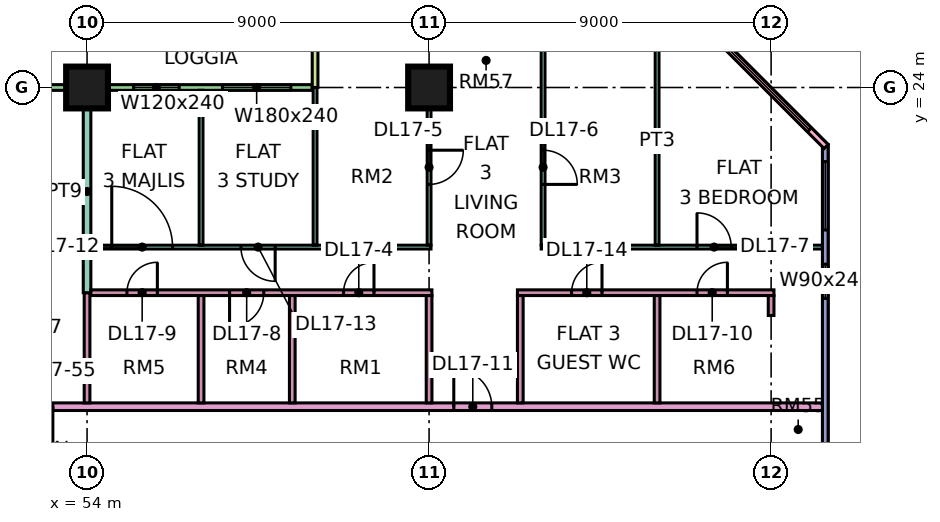
"""IFC4 building model, lengths in metres.
Left out: names, types, materials, properties, quantities, classifications, styles, units other than length and angle.
Written with IfcOpenShell. Run it as: python <this file> out.ifc"""

import sys

from ifc_helpers import new_model, si_unit, direction, frame, frame_2d, origin, origin_2d, place, context, subcontext, project, spatial, rectangle, extrude, element, fill, save


model = new_model("IFC4")
c1 = context("Model", 3, precision=1e-05, world=origin(), true_north=direction((0.0, 1.0)))
c2 = subcontext(c1, "Body", "Model", "MODEL_VIEW")
j1 = project(units=[si_unit("LENGTHUNIT", "METRE"), si_unit("PLANEANGLEUNIT", "RADIAN")], contexts=[c1])
p1 = place(None, origin())
s1 = spatial("IfcSite", under=j1, at=p1, CompositionType="ELEMENT")
p2 = place(p1, origin())
s2 = spatial("IfcBuilding", under=s1, at=p2, CompositionType="ELEMENT")
p3 = place(p2, frame((0.0, 0.0, 78.9)))
s3 = spatial("IfcBuildingStorey", under=s2, at=p3, CompositionType="ELEMENT", Elevation=78.9)
for number, where, z_axis, x_axis in (
    (1, (54.0, 24.0, 0.0), (0.0, 0.0, 1.0), (1.0, 0.0, 0.0)),
    (2, (63.0, 24.0, 0.0), (0.0, 0.0, 1.0), (1.0, 0.0, 0.0)),
):
    element("IfcColumn", number, at=place(p3, frame(where, z_axis=z_axis, x_axis=x_axis)), inside=s3, PredefinedType="COLUMN", context=c2, shape_type="SweptSolid", body=[
        extrude(rectangle(XDim=1.1, YDim=1.1, at=origin_2d()), origin(), (0.0, 0.0, 1.0), 3.75),
    ])
p4 = place(p3, frame((59.925, 24.0, 0.0), z_axis=(0.0, 0.0, 1.0), x_axis=(-1.0, 0.0, 0.0)))
e3 = element("IfcWall", 3, at=p4, inside=s3, PredefinedType="SOLIDWALL", context=c2, shape_type="SweptSolid", body=[
    extrude(rectangle(XDim=11.85, YDim=0.15, at=frame_2d((5.925, 0.0))), origin(), (0.0, 0.0, 1.0), 3.35),
])
p5 = place(p4, frame((0.562, 0.0, 0.45)))
e4 = element("IfcOpeningElement", 4, at=p5, cuts=e3, PredefinedType="OPENING", context=c2, shape_type="SweptSolid", body=[
    extrude(rectangle(XDim=1.8, YDim=2.4, at=frame_2d((0.9, 1.2))), frame((0.0, 0.085, 0.0), z_axis=(0.0, -1.0, 0.0), x_axis=(1.0, 0.0, 0.0)), (0.0, 0.0, 1.0), 0.17),
])
p6 = place(p4, frame((3.5, 0.0, 0.45)))
e5 = element("IfcOpeningElement", 5, at=p6, cuts=e3, PredefinedType="OPENING", context=c2, shape_type="SweptSolid", body=[
    extrude(rectangle(XDim=1.2, YDim=2.4, at=frame_2d((0.6, 1.2))), frame((0.0, 0.085, 0.0), z_axis=(0.0, -1.0, 0.0), x_axis=(1.0, 0.0, 0.0)), (0.0, 0.0, 1.0), 0.17),
])
p7 = place(p4, frame((7.113, 0.0, 0.45)))
e6 = element("IfcOpeningElement", 6, at=p7, cuts=e3, PredefinedType="OPENING", context=c2, shape_type="SweptSolid", body=[
    extrude(rectangle(XDim=4.2, YDim=2.4, at=frame_2d((2.1, 1.2))), frame((0.0, 0.085, 0.0), z_axis=(0.0, -1.0, 0.0), x_axis=(1.0, 0.0, 0.0)), (0.0, 0.0, 1.0), 0.17),
])
p8 = place(p3, frame((60.0, 25.5, 0.0), z_axis=(0.0, 0.0, 1.0), x_axis=(0.0, -1.0, 0.0)))
e7 = element("IfcWall", 7, at=p8, inside=s3, PredefinedType="SOLIDWALL", context=c2, shape_type="SweptSolid", body=[
    extrude(rectangle(XDim=1.5, YDim=0.15, at=frame_2d((0.75, 0.0))), origin(), (0.0, 0.0, 1.0), 3.35),
])
p9 = place(p3, frame((73.425, 12.075, 0.0), z_axis=(0.0, 0.0, 1.0), x_axis=(0.0, 1.0, 0.0)))
e8 = element("IfcWall", 8, at=p9, inside=s3, PredefinedType="SOLIDWALL", context=c2, shape_type="SweptSolid", body=[
    extrude(rectangle(XDim=10.425, YDim=0.15, at=frame_2d((5.212, 0.0))), origin(), (0.0, 0.0, 1.0), 3.35),
])
p10 = place(p9, frame((6.375, 0.0, 0.45)))
e9 = element("IfcOpeningElement", 9, at=p10, cuts=e8, PredefinedType="OPENING", context=c2, shape_type="SweptSolid", body=[
    extrude(rectangle(XDim=0.9, YDim=2.4, at=frame_2d((0.45, 1.2))), frame((0.0, 0.085, 0.0), z_axis=(0.0, -1.0, 0.0), x_axis=(1.0, 0.0, 0.0)), (0.0, 0.0, 1.0), 0.17),
])
p11 = place(p9, frame((8.175, 0.0, 0.45)))
e10 = element("IfcOpeningElement", 10, at=p11, cuts=e8, PredefinedType="OPENING", context=c2, shape_type="SweptSolid", body=[
    extrude(rectangle(XDim=1.8, YDim=2.4, at=frame_2d((0.9, 1.2))), frame((0.0, 0.085, 0.0), z_axis=(0.0, -1.0, 0.0), x_axis=(1.0, 0.0, 0.0)), (0.0, 0.0, 1.0), 0.17),
])
p12 = place(p3, frame((73.447, 22.447, 0.0), z_axis=(0.0, 0.0, 1.0), x_axis=(-0.707106781187, 0.707106781187, 0.0)))
e11 = element("IfcWall", 11, at=p12, inside=s3, PredefinedType="SOLIDWALL", context=c2, shape_type="SweptSolid", body=[
    extrude(rectangle(XDim=4.243, YDim=0.15, at=frame_2d((2.121, 0.0))), origin(), (0.0, 0.0, 1.0), 3.35),
])
p13 = place(p12, frame((0.621, 0.0, 0.45)))
e12 = element("IfcOpeningElement", 12, at=p13, cuts=e11, PredefinedType="OPENING", context=c2, shape_type="SweptSolid", body=[
    extrude(rectangle(XDim=3.0, YDim=2.4, at=frame_2d((1.5, 1.2))), frame((0.0, 0.085, 0.0), z_axis=(0.0, -1.0, 0.0), x_axis=(1.0, 0.0, 0.0)), (0.0, 0.0, 1.0), 0.17),
])
p14 = place(p3, frame((51.225, 15.6, 0.0), z_axis=(0.0, 0.0, 1.0), x_axis=(1.0, 0.0, 0.0)))
e13 = element("IfcWall", 13, at=p14, inside=s3, PredefinedType="PARTITIONING", context=c2, shape_type="SweptSolid", body=[
    extrude(rectangle(XDim=22.125, YDim=0.2, at=frame_2d((11.062, 0.0))), origin(), (0.0, 0.0, 1.0), 3.35),
])
p15 = place(p14, frame((12.425, 0.0, 0.0)))
e14 = element("IfcOpeningElement", 14, at=p15, cuts=e13, PredefinedType="OPENING", context=c2, shape_type="SweptSolid", body=[
    extrude(rectangle(XDim=1.0, YDim=2.1, at=frame_2d((0.5, 1.05))), frame((0.0, 0.11, 0.0), z_axis=(0.0, -1.0, 0.0), x_axis=(1.0, 0.0, 0.0)), (0.0, 0.0, 1.0), 0.22),
])
p16 = place(p14, frame((0.875, 0.0, 0.0)))
e15 = element("IfcOpeningElement", 15, at=p16, cuts=e13, PredefinedType="OPENING", context=c2, shape_type="SweptSolid", body=[
    extrude(rectangle(XDim=1.0, YDim=2.1, at=frame_2d((0.5, 1.05))), frame((0.0, 0.11, 0.0), z_axis=(0.0, -1.0, 0.0), x_axis=(1.0, 0.0, 0.0)), (0.0, 0.0, 1.0), 0.22),
])
p17 = place(p3, frame((54.0, 15.7, 0.0), z_axis=(0.0, 0.0, 1.0), x_axis=(0.0, 1.0, 0.0)))
e16 = element("IfcWall", 16, at=p17, inside=s3, PredefinedType="PARTITIONING", context=c2, shape_type="SweptSolid", body=[
    extrude(rectangle(XDim=2.9, YDim=0.15, at=frame_2d((1.45, 0.0))), origin(), (0.0, 0.0, 1.0), 3.35),
])
p18 = place(p3, frame((54.0, 18.6, 0.0), z_axis=(0.0, 0.0, 1.0), x_axis=(0.0, 1.0, 0.0)))
e17 = element("IfcWall", 17, at=p18, inside=s3, PredefinedType="PARTITIONING", context=c2, shape_type="SweptSolid", body=[
    extrude(rectangle(XDim=5.326, YDim=0.2, at=frame_2d((2.663, 0.0))), origin(), (0.0, 0.0, 1.0), 3.35),
])
p19 = place(p3, frame((54.1, 18.6, 0.0), z_axis=(0.0, 0.0, 1.0), x_axis=(1.0, 0.0, 0.0)))
e18 = element("IfcWall", 18, at=p19, inside=s3, PredefinedType="PARTITIONING", context=c2, shape_type="SweptSolid", body=[
    extrude(rectangle(XDim=8.975, YDim=0.15, at=frame_2d((4.487, 0.0))), origin(), (0.0, 0.0, 1.0), 3.35),
])
p20 = place(p19, frame((6.65, 0.0, 0.0)))
e19 = element("IfcOpeningElement", 19, at=p20, cuts=e18, PredefinedType="OPENING", context=c2, shape_type="SweptSolid", body=[
    extrude(rectangle(XDim=0.8, YDim=2.1, at=frame_2d((0.4, 1.05))), frame((0.0, 0.085, 0.0), z_axis=(0.0, -1.0, 0.0), x_axis=(1.0, 0.0, 0.0)), (0.0, 0.0, 1.0), 0.17),
])
p21 = place(p19, frame((3.65, 0.0, 0.0)))
e20 = element("IfcOpeningElement", 20, at=p21, cuts=e18, PredefinedType="OPENING", context=c2, shape_type="SweptSolid", body=[
    extrude(rectangle(XDim=0.9, YDim=2.1, at=frame_2d((0.45, 1.05))), frame((0.0, 0.085, 0.0), z_axis=(0.0, -1.0, 0.0), x_axis=(1.0, 0.0, 0.0)), (0.0, 0.0, 1.0), 0.17),
])
p22 = place(p19, frame((0.95, 0.0, 0.0)))
e21 = element("IfcOpeningElement", 21, at=p22, cuts=e18, PredefinedType="OPENING", context=c2, shape_type="SweptSolid", body=[
    extrude(rectangle(XDim=0.8, YDim=2.1, at=frame_2d((0.4, 1.05))), frame((0.0, 0.085, 0.0), z_axis=(0.0, -1.0, 0.0), x_axis=(1.0, 0.0, 0.0)), (0.0, 0.0, 1.0), 0.17),
])
p23 = place(p3, frame((54.1, 19.8, 0.0), z_axis=(0.0, 0.0, 1.0), x_axis=(1.0, 0.0, 0.0)))
e22 = element("IfcWall", 22, at=p23, inside=s3, PredefinedType="PARTITIONING", context=c2, shape_type="SweptSolid", body=[
    extrude(rectangle(XDim=8.95, YDim=0.1, at=frame_2d((4.475, 0.0))), origin(), (0.0, 0.0, 1.0), 3.35),
])
p24 = place(p23, frame((0.55, 0.0, 0.0)))
e23 = element("IfcOpeningElement", 23, at=p24, cuts=e22, PredefinedType="OPENING", context=c2, shape_type="SweptSolid", body=[
    extrude(rectangle(XDim=1.6, YDim=2.1, at=frame_2d((0.8, 1.05))), frame((0.0, 0.06, 0.0), z_axis=(0.0, -1.0, 0.0), x_axis=(1.0, 0.0, 0.0)), (0.0, 0.0, 1.0), 0.12),
])
p25 = place(p23, frame((3.95, 0.0, 0.0)))
e24 = element("IfcOpeningElement", 24, at=p25, cuts=e22, PredefinedType="OPENING", context=c2, shape_type="SweptSolid", body=[
    extrude(rectangle(XDim=0.9, YDim=2.1, at=frame_2d((0.45, 1.05))), frame((0.0, 0.06, 0.0), z_axis=(0.0, -1.0, 0.0), x_axis=(1.0, 0.0, 0.0)), (0.0, 0.0, 1.0), 0.12),
])
p26 = place(p3, frame((57.0, 15.7, 0.0), z_axis=(0.0, 0.0, 1.0), x_axis=(0.0, 1.0, 0.0)))
e25 = element("IfcWall", 25, at=p26, inside=s3, PredefinedType="PARTITIONING", context=c2, shape_type="SweptSolid", body=[
    extrude(rectangle(XDim=2.825, YDim=0.15, at=frame_2d((1.413, 0.0))), origin(), (0.0, 0.0, 1.0), 3.35),
])
p27 = place(p3, frame((57.0, 19.85, 0.0), z_axis=(0.0, 0.0, 1.0), x_axis=(0.0, 1.0, 0.0)))
e26 = element("IfcWall", 26, at=p27, inside=s3, PredefinedType="PARTITIONING", context=c2, shape_type="SweptSolid", body=[
    extrude(rectangle(XDim=4.076, YDim=0.1, at=frame_2d((2.038, 0.0))), origin(), (0.0, 0.0, 1.0), 3.35),
])
p28 = place(p3, frame((59.4, 15.7, 0.0), z_axis=(0.0, 0.0, 1.0), x_axis=(0.0, 1.0, 0.0)))
e27 = element("IfcWall", 27, at=p28, inside=s3, PredefinedType="PARTITIONING", context=c2, shape_type="SweptSolid", body=[
    extrude(rectangle(XDim=2.825, YDim=0.15, at=frame_2d((1.413, 0.0))), origin(), (0.0, 0.0, 1.0), 3.35),
])
p29 = place(p3, frame((60.0, 19.85, 0.0), z_axis=(0.0, 0.0, 1.0), x_axis=(0.0, 1.0, 0.0)))
e28 = element("IfcWall", 28, at=p29, inside=s3, PredefinedType="PARTITIONING", context=c2, shape_type="SweptSolid", body=[
    extrude(rectangle(XDim=4.15, YDim=0.1, at=frame_2d((2.075, 0.0))), origin(), (0.0, 0.0, 1.0), 3.35),
])
p30 = place(p3, frame((63.0, 15.7, 0.0), z_axis=(0.0, 0.0, 1.0), x_axis=(0.0, 1.0, 0.0)))
e29 = element("IfcWall", 29, at=p30, inside=s3, PredefinedType="PARTITIONING", context=c2, shape_type="SweptSolid", body=[
    extrude(rectangle(XDim=2.825, YDim=0.15, at=frame_2d((1.413, 0.0))), origin(), (0.0, 0.0, 1.0), 3.35),
])
p31 = place(p3, frame((63.0, 19.85, 0.0), z_axis=(0.0, 0.0, 1.0), x_axis=(0.0, 1.0, 0.0)))
e30 = element("IfcWall", 30, at=p31, inside=s3, PredefinedType="PARTITIONING", context=c2, shape_type="SweptSolid", body=[
    extrude(rectangle(XDim=4.15, YDim=0.1, at=frame_2d((2.075, 0.0))), origin(), (0.0, 0.0, 1.0), 3.35),
])
p32 = place(p31, frame((1.6, 0.0, 0.0)))
e31 = element("IfcOpeningElement", 31, at=p32, cuts=e30, PredefinedType="OPENING", context=c2, shape_type="SweptSolid", body=[
    extrude(rectangle(XDim=0.9, YDim=2.1, at=frame_2d((0.45, 1.05))), frame((0.0, 0.06, 0.0), z_axis=(0.0, -1.0, 0.0), x_axis=(1.0, 0.0, 0.0)), (0.0, 0.0, 1.0), 0.12),
])
p33 = place(p3, frame((65.325, 18.6, 0.0), z_axis=(0.0, 0.0, 1.0), x_axis=(1.0, 0.0, 0.0)))
e32 = element("IfcWall", 32, at=p33, inside=s3, PredefinedType="PARTITIONING", context=c2, shape_type="SweptSolid", body=[
    extrude(rectangle(XDim=6.75, YDim=0.15, at=frame_2d((3.375, 0.0))), origin(), (0.0, 0.0, 1.0), 3.35),
])
p34 = place(p33, frame((4.725, 0.0, 0.0)))
e33 = element("IfcOpeningElement", 33, at=p34, cuts=e32, PredefinedType="OPENING", context=c2, shape_type="SweptSolid", body=[
    extrude(rectangle(XDim=0.8, YDim=2.1, at=frame_2d((0.4, 1.05))), frame((0.0, 0.085, 0.0), z_axis=(0.0, -1.0, 0.0), x_axis=(1.0, 0.0, 0.0)), (0.0, 0.0, 1.0), 0.17),
])
p35 = place(p33, frame((1.425, 0.0, 0.0)))
e34 = element("IfcOpeningElement", 34, at=p35, cuts=e32, PredefinedType="OPENING", context=c2, shape_type="SweptSolid", body=[
    extrude(rectangle(XDim=0.8, YDim=2.1, at=frame_2d((0.4, 1.05))), frame((0.0, 0.085, 0.0), z_axis=(0.0, -1.0, 0.0), x_axis=(1.0, 0.0, 0.0)), (0.0, 0.0, 1.0), 0.17),
])
p36 = place(p3, frame((65.4, 15.7, 0.0), z_axis=(0.0, 0.0, 1.0), x_axis=(0.0, 1.0, 0.0)))
e35 = element("IfcWall", 35, at=p36, inside=s3, PredefinedType="PARTITIONING", context=c2, shape_type="SweptSolid", body=[
    extrude(rectangle(XDim=2.825, YDim=0.15, at=frame_2d((1.413, 0.0))), origin(), (0.0, 0.0, 1.0), 3.35),
])
p37 = place(p3, frame((65.95, 19.8, 0.0), z_axis=(0.0, 0.0, 1.0), x_axis=(1.0, 0.0, 0.0)))
e36 = element("IfcWall", 36, at=p37, inside=s3, PredefinedType="PARTITIONING", context=c2, shape_type="SweptSolid", body=[
    extrude(rectangle(XDim=7.401, YDim=0.1, at=frame_2d((3.701, 0.0))), origin(), (0.0, 0.0, 1.0), 3.35),
])
p38 = place(p37, frame((4.1, 0.0, 0.0)))
e37 = element("IfcOpeningElement", 37, at=p38, cuts=e36, PredefinedType="OPENING", context=c2, shape_type="SweptSolid", body=[
    extrude(rectangle(XDim=0.9, YDim=2.1, at=frame_2d((0.45, 1.05))), frame((0.0, 0.06, 0.0), z_axis=(0.0, -1.0, 0.0), x_axis=(1.0, 0.0, 0.0)), (0.0, 0.0, 1.0), 0.12),
])
p39 = place(p3, frame((66.0, 19.85, 0.0), z_axis=(0.0, 0.0, 1.0), x_axis=(0.0, 1.0, 0.0)))
e38 = element("IfcWall", 38, at=p39, inside=s3, PredefinedType="PARTITIONING", context=c2, shape_type="SweptSolid", body=[
    extrude(rectangle(XDim=5.5, YDim=0.1, at=frame_2d((2.75, 0.0))), origin(), (0.0, 0.0, 1.0), 3.35),
])
p40 = place(p39, frame((1.6, 0.0, 0.0)))
e39 = element("IfcOpeningElement", 39, at=p40, cuts=e38, PredefinedType="OPENING", context=c2, shape_type="SweptSolid", body=[
    extrude(rectangle(XDim=0.9, YDim=2.1, at=frame_2d((0.45, 1.05))), frame((0.0, 0.06, 0.0), z_axis=(0.0, -1.0, 0.0), x_axis=(1.0, 0.0, 0.0)), (0.0, 0.0, 1.0), 0.12),
])
p41 = place(p3, frame((69.0, 15.7, 0.0), z_axis=(0.0, 0.0, 1.0), x_axis=(0.0, 1.0, 0.0)))
e40 = element("IfcWall", 40, at=p41, inside=s3, PredefinedType="PARTITIONING", context=c2, shape_type="SweptSolid", body=[
    extrude(rectangle(XDim=2.825, YDim=0.15, at=frame_2d((1.413, 0.0))), origin(), (0.0, 0.0, 1.0), 3.35),
])
p42 = place(p3, frame((69.0, 19.85, 0.0), z_axis=(0.0, 0.0, 1.0), x_axis=(0.0, 1.0, 0.0)))
e41 = element("IfcWall", 41, at=p42, inside=s3, PredefinedType="PARTITIONING", context=c2, shape_type="SweptSolid", body=[
    extrude(rectangle(XDim=5.501, YDim=0.1, at=frame_2d((2.75, 0.0))), origin(), (0.0, 0.0, 1.0), 3.35),
])
p43 = place(p3, frame((72.0, 18.0, 0.0), z_axis=(0.0, 0.0, 1.0), x_axis=(0.0, 1.0, 0.0)))
e42 = element("IfcWall", 42, at=p43, inside=s3, PredefinedType="PARTITIONING", context=c2, shape_type="SweptSolid", body=[
    extrude(rectangle(XDim=0.525, YDim=0.15, at=frame_2d((0.262, 0.0))), origin(), (0.0, 0.0, 1.0), 3.35),
])
p44 = place(p5, origin())
e43 = element("IfcWindow", 43, at=p44, inside=s3, PartitioningType="SINGLE_PANEL", PredefinedType="WINDOW", context=c2, shape_type="SweptSolid", body=[
    extrude(rectangle(XDim=1.8, YDim=2.4, at=frame_2d((0.9, 1.2))), frame((0.0, 0.03, 0.0), z_axis=(0.0, -1.0, 0.0), x_axis=(1.0, 0.0, 0.0)), (0.0, 0.0, 1.0), 0.06),
])
fill(e4, e43)
p45 = place(p6, origin())
e44 = element("IfcWindow", 44, at=p45, inside=s3, PartitioningType="SINGLE_PANEL", PredefinedType="WINDOW", context=c2, shape_type="SweptSolid", body=[
    extrude(rectangle(XDim=1.2, YDim=2.4, at=frame_2d((0.6, 1.2))), frame((0.0, 0.03, 0.0), z_axis=(0.0, -1.0, 0.0), x_axis=(1.0, 0.0, 0.0)), (0.0, 0.0, 1.0), 0.06),
])
fill(e5, e44)
p46 = place(p10, origin())
e45 = element("IfcWindow", 45, at=p46, inside=s3, PartitioningType="SINGLE_PANEL", PredefinedType="WINDOW", context=c2, shape_type="SweptSolid", body=[
    extrude(rectangle(XDim=0.9, YDim=2.4, at=frame_2d((0.45, 1.2))), frame((0.0, 0.03, 0.0), z_axis=(0.0, -1.0, 0.0), x_axis=(1.0, 0.0, 0.0)), (0.0, 0.0, 1.0), 0.06),
])
fill(e9, e45)
p47 = place(p11, origin())
e46 = element("IfcWindow", 46, at=p47, inside=s3, PartitioningType="SINGLE_PANEL", PredefinedType="WINDOW", context=c2, shape_type="SweptSolid", body=[
    extrude(rectangle(XDim=1.8, YDim=2.4, at=frame_2d((0.9, 1.2))), frame((0.0, 0.03, 0.0), z_axis=(0.0, -1.0, 0.0), x_axis=(1.0, 0.0, 0.0)), (0.0, 0.0, 1.0), 0.06),
])
fill(e10, e46)
p48 = place(p13, origin())
e47 = element("IfcWindow", 47, at=p48, inside=s3, PartitioningType="SINGLE_PANEL", PredefinedType="WINDOW", context=c2, shape_type="SweptSolid", body=[
    extrude(rectangle(XDim=3.0, YDim=2.4, at=frame_2d((1.5, 1.2))), frame((0.0, 0.03, 0.0), z_axis=(0.0, -1.0, 0.0), x_axis=(1.0, 0.0, 0.0)), (0.0, 0.0, 1.0), 0.06),
])
fill(e12, e47)
p49 = place(p20, frame((0.8, 0.0, 0.0), z_axis=(0.0, 0.0, 1.0), x_axis=(-1.0, 0.0, 0.0)))
e48 = element("IfcDoor", 48, at=p49, inside=s3, OperationType="SINGLE_SWING_RIGHT", PredefinedType="DOOR", context=c2, shape_type="SweptSolid", body=[
    extrude(rectangle(XDim=0.8, YDim=2.1, at=frame_2d((0.4, 1.05))), frame((0.0, 0.025, 0.0), z_axis=(0.0, -1.0, 0.0), x_axis=(1.0, 0.0, 0.0)), (0.0, 0.0, 1.0), 0.05),
])
fill(e19, e48)
p50 = place(p32, origin())
e49 = element("IfcDoor", 49, at=p50, inside=s3, OperationType="SINGLE_SWING_RIGHT", PredefinedType="DOOR", context=c2, shape_type="SweptSolid", body=[
    extrude(rectangle(XDim=0.9, YDim=2.1, at=frame_2d((0.45, 1.05))), frame((0.0, 0.025, 0.0), z_axis=(0.0, -1.0, 0.0), x_axis=(1.0, 0.0, 0.0)), (0.0, 0.0, 1.0), 0.05),
])
fill(e31, e49)
p51 = place(p40, frame((0.9, 0.0, 0.0), z_axis=(0.0, 0.0, 1.0), x_axis=(-1.0, 0.0, 0.0)))
e50 = element("IfcDoor", 50, at=p51, inside=s3, OperationType="SINGLE_SWING_LEFT", PredefinedType="DOOR", context=c2, shape_type="SweptSolid", body=[
    extrude(rectangle(XDim=0.9, YDim=2.1, at=frame_2d((0.45, 1.05))), frame((0.0, 0.025, 0.0), z_axis=(0.0, -1.0, 0.0), x_axis=(1.0, 0.0, 0.0)), (0.0, 0.0, 1.0), 0.05),
])
fill(e39, e50)
p52 = place(p38, origin())
e51 = element("IfcDoor", 51, at=p52, inside=s3, OperationType="SINGLE_SWING_LEFT", PredefinedType="DOOR", context=c2, shape_type="SweptSolid", body=[
    extrude(rectangle(XDim=0.9, YDim=2.1, at=frame_2d((0.45, 1.05))), frame((0.0, 0.025, 0.0), z_axis=(0.0, -1.0, 0.0), x_axis=(1.0, 0.0, 0.0)), (0.0, 0.0, 1.0), 0.05),
])
fill(e37, e51)
p53 = place(p21, frame((0.9, 0.0, 0.0), z_axis=(0.0, 0.0, 1.0), x_axis=(-1.0, 0.0, 0.0)))
e52 = element("IfcDoor", 52, at=p53, inside=s3, OperationType="SINGLE_SWING_LEFT", PredefinedType="DOOR", context=c2, shape_type="SweptSolid", body=[
    extrude(rectangle(XDim=0.9, YDim=2.1, at=frame_2d((0.45, 1.05))), frame((0.0, 0.025, 0.0), z_axis=(0.0, -1.0, 0.0), x_axis=(1.0, 0.0, 0.0)), (0.0, 0.0, 1.0), 0.05),
])
fill(e20, e52)
p54 = place(p22, frame((0.8, 0.0, 0.0), z_axis=(0.0, 0.0, 1.0), x_axis=(-1.0, 0.0, 0.0)))
e53 = element("IfcDoor", 53, at=p54, inside=s3, OperationType="SINGLE_SWING_RIGHT", PredefinedType="DOOR", context=c2, shape_type="SweptSolid", body=[
    extrude(rectangle(XDim=0.8, YDim=2.1, at=frame_2d((0.4, 1.05))), frame((0.0, 0.025, 0.0), z_axis=(0.0, -1.0, 0.0), x_axis=(1.0, 0.0, 0.0)), (0.0, 0.0, 1.0), 0.05),
])
fill(e21, e53)
p55 = place(p34, frame((0.8, 0.0, 0.0), z_axis=(0.0, 0.0, 1.0), x_axis=(-1.0, 0.0, 0.0)))
e54 = element("IfcDoor", 54, at=p55, inside=s3, OperationType="SINGLE_SWING_RIGHT", PredefinedType="DOOR", context=c2, shape_type="SweptSolid", body=[
    extrude(rectangle(XDim=0.8, YDim=2.1, at=frame_2d((0.4, 1.05))), frame((0.0, 0.025, 0.0), z_axis=(0.0, -1.0, 0.0), x_axis=(1.0, 0.0, 0.0)), (0.0, 0.0, 1.0), 0.05),
])
fill(e33, e54)
p56 = place(p15, origin())
e55 = element("IfcDoor", 55, at=p56, inside=s3, OperationType="SINGLE_SWING_LEFT", PredefinedType="DOOR", context=c2, shape_type="SweptSolid", body=[
    extrude(rectangle(XDim=1.0, YDim=2.1, at=frame_2d((0.5, 1.05))), frame((0.0, 0.025, 0.0), z_axis=(0.0, -1.0, 0.0), x_axis=(1.0, 0.0, 0.0)), (0.0, 0.0, 1.0), 0.05),
])
fill(e14, e55)
p57 = place(p24, origin())
e56 = element("IfcDoor", 56, at=p57, inside=s3, OperationType="DOUBLE_DOOR_SINGLE_SWING", PredefinedType="DOOR", context=c2, shape_type="SweptSolid", body=[
    extrude(rectangle(XDim=1.6, YDim=2.1, at=frame_2d((0.8, 1.05))), frame((0.0, 0.025, 0.0), z_axis=(0.0, -1.0, 0.0), x_axis=(1.0, 0.0, 0.0)), (0.0, 0.0, 1.0), 0.05),
])
fill(e23, e56)
p58 = place(p25, origin())
e57 = element("IfcDoor", 57, at=p58, inside=s3, OperationType="SINGLE_SWING_RIGHT", PredefinedType="DOOR", context=c2, shape_type="SweptSolid", body=[
    extrude(rectangle(XDim=0.9, YDim=2.1, at=frame_2d((0.45, 1.05))), frame((0.0, 0.025, 0.0), z_axis=(0.0, -1.0, 0.0), x_axis=(1.0, 0.0, 0.0)), (0.0, 0.0, 1.0), 0.05),
])
fill(e24, e57)
p59 = place(p35, frame((0.8, 0.0, 0.0), z_axis=(0.0, 0.0, 1.0), x_axis=(-1.0, 0.0, 0.0)))
e58 = element("IfcDoor", 58, at=p59, inside=s3, OperationType="SINGLE_SWING_RIGHT", PredefinedType="DOOR", context=c2, shape_type="SweptSolid", body=[
    extrude(rectangle(XDim=0.8, YDim=2.1, at=frame_2d((0.4, 1.05))), frame((0.0, 0.025, 0.0), z_axis=(0.0, -1.0, 0.0), x_axis=(1.0, 0.0, 0.0)), (0.0, 0.0, 1.0), 0.05),
])
fill(e34, e58)
p60 = place(p16, origin())
e59 = element("IfcDoor", 59, at=p60, inside=s3, OperationType="SINGLE_SWING_RIGHT", PredefinedType="DOOR", context=c2, shape_type="SweptSolid", body=[
    extrude(rectangle(XDim=1.0, YDim=2.1, at=frame_2d((0.5, 1.05))), frame((0.0, 0.025, 0.0), z_axis=(0.0, -1.0, 0.0), x_axis=(1.0, 0.0, 0.0)), (0.0, 0.0, 1.0), 0.05),
])
fill(e15, e59)
save(model, sys.argv[1])
